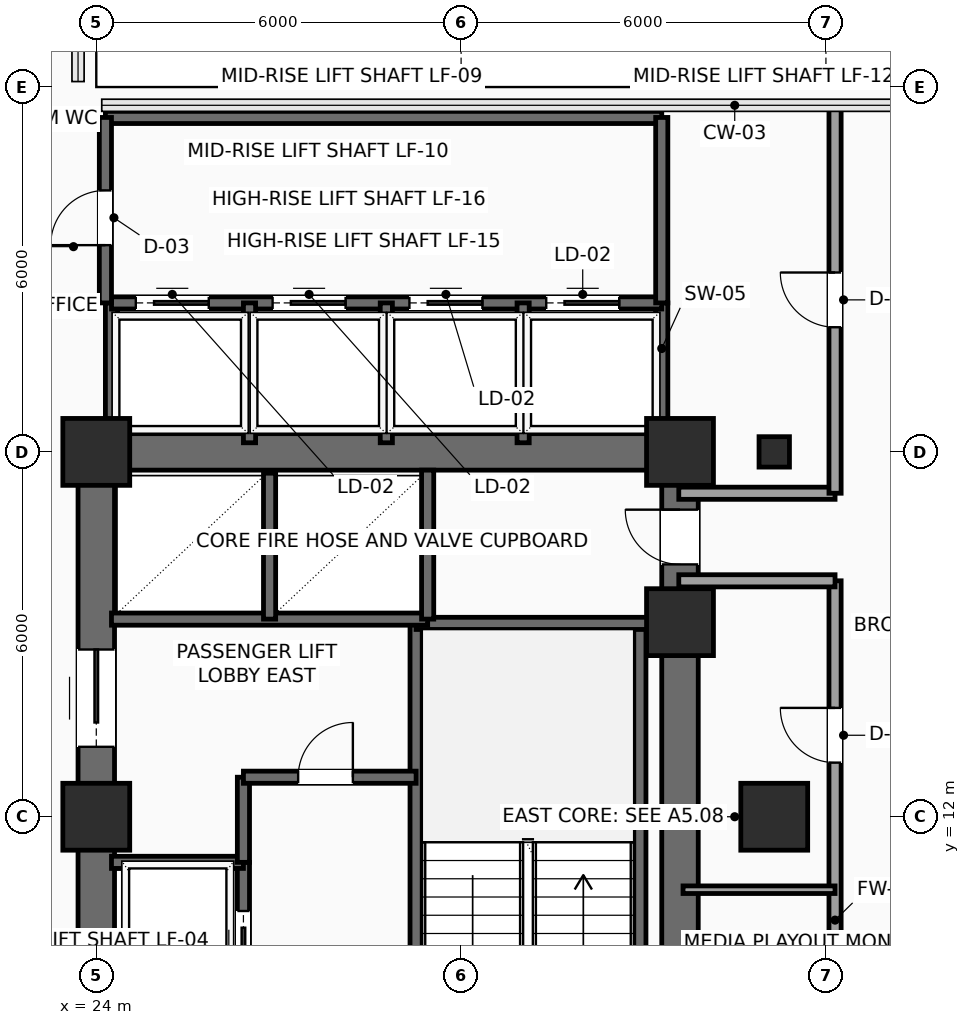
"""IFC4 building model, lengths in metres.
Left out: names, types, materials, properties, quantities, classifications, styles, units other than length and angle.
Written with IfcOpenShell. Run it as: python <this file> out.ifc"""

import sys

from ifc_helpers import new_model, si_unit, direction, frame, frame_2d, origin, origin_2d, place, context, subcontext, project, spatial, rectangle, hollow_rectangle, extrude, element, fill, save


model = new_model("IFC4")
c1 = context("Model", 3, precision=1e-05, world=origin(), true_north=direction((0.0, 1.0)))
c2 = subcontext(c1, "Body", "Model", "MODEL_VIEW")
j1 = project(units=[si_unit("LENGTHUNIT", "METRE"), si_unit("PLANEANGLEUNIT", "RADIAN")], contexts=[c1])
p1 = place(None, origin())
s1 = spatial("IfcSite", under=j1, at=p1, CompositionType="ELEMENT")
p2 = place(p1, origin())
s2 = spatial("IfcBuilding", under=s1, at=p2, CompositionType="ELEMENT")
p3 = place(p2, frame((0.0, 0.0, 149.4)))
s3 = spatial("IfcBuildingStorey", under=s2, at=p3, CompositionType="ELEMENT", Elevation=149.4)
for number, where, z_axis, x_axis in (
    (1, (24.0, 12.0, 0.0), (0.0, 0.0, 1.0), (1.0, 0.0, 0.0)),
    (2, (24.0, 18.0, 0.0), (0.0, 0.0, 1.0), (1.0, 0.0, 0.0)),
    (3, (33.6, 15.2, 0.0), (0.0, 0.0, 1.0), (1.0, 0.0, 0.0)),
    (4, (33.6, 18.0, 0.0), (0.0, 0.0, 1.0), (1.0, 0.0, 0.0)),
    (5, (35.15, 12.0, 0.0), (0.0, 0.0, 1.0), (1.0, 0.0, 0.0)),
):
    element("IfcColumn", number, at=place(p3, frame(where, z_axis=z_axis, x_axis=x_axis)), inside=s3, PredefinedType="COLUMN", context=c2, shape_type="SweptSolid", body=[
        extrude(rectangle(XDim=1.1, YDim=1.1, at=origin_2d()), origin(), (0.0, 0.0, 1.0), 3.75),
    ])
p4 = place(p3, frame((35.15, 18.0, 0.0), z_axis=(0.0, 0.0, 1.0), x_axis=(1.0, 0.0, 0.0)))
e6 = element("IfcColumn", 6, at=p4, inside=s3, PredefinedType="COLUMN", context=c2, shape_type="SweptSolid", body=[
    extrude(hollow_rectangle(XDim=0.5, YDim=0.5, WallThickness=0.025, InnerFilletRadius=0.025, OuterFilletRadius=0.04, at=origin_2d()), origin(), (0.0, 0.0, 1.0), 3.75),
])
p5 = place(p3, frame((24.0, 18.0, 0.0), z_axis=(0.0, 0.0, 1.0), x_axis=(1.0, 0.0, 0.0)))
e7 = element("IfcWall", 7, at=p5, inside=s3, PredefinedType="SHEAR", context=c2, shape_type="SweptSolid", body=[
    extrude(rectangle(XDim=9.6, YDim=0.6, at=frame_2d((4.8, 0.0))), origin(), (0.0, 0.0, 1.0), 3.525),
])
p6 = place(p3, frame((24.0, 6.0, 0.0), z_axis=(0.0, 0.0, 1.0), x_axis=(0.0, 1.0, 0.0)))
e8 = element("IfcWall", 8, at=p6, inside=s3, PredefinedType="SHEAR", context=c2, shape_type="SweptSolid", body=[
    extrude(rectangle(XDim=12.0, YDim=0.6, at=frame_2d((6.0, 0.0))), origin(), (0.0, 0.0, 1.0), 3.525),
])
p7 = place(p6, frame((7.15, 0.0, 0.0)))
e9 = element("IfcOpeningElement", 9, at=p7, cuts=e8, PredefinedType="OPENING", context=c2, shape_type="SweptSolid", body=[
    extrude(rectangle(XDim=1.6, YDim=2.3, at=frame_2d((0.8, 1.15))), frame((0.0, 0.31, 0.0), z_axis=(0.0, -1.0, 0.0), x_axis=(1.0, 0.0, 0.0)), (0.0, 0.0, 1.0), 0.62),
])
p8 = place(p3, frame((33.6, 6.0, 0.0), z_axis=(0.0, 0.0, 1.0), x_axis=(0.0, 1.0, 0.0)))
e10 = element("IfcWall", 10, at=p8, inside=s3, PredefinedType="SHEAR", context=c2, shape_type="SweptSolid", body=[
    extrude(rectangle(XDim=12.0, YDim=0.6, at=frame_2d((6.0, 0.0))), origin(), (0.0, 0.0, 1.0), 3.525),
])
p9 = place(p8, frame((10.15, 0.0, 0.0)))
e11 = element("IfcOpeningElement", 11, at=p9, cuts=e10, PredefinedType="OPENING", context=c2, shape_type="SweptSolid", body=[
    extrude(rectangle(XDim=0.9, YDim=2.15, at=frame_2d((0.45, 1.075))), frame((0.0, 0.31, 0.0), z_axis=(0.0, -1.0, 0.0), x_axis=(1.0, 0.0, 0.0)), (0.0, 0.0, 1.0), 0.62),
])
p10 = place(p3, frame((29.26, 6.3, 0.0), z_axis=(0.0, 0.0, 1.0), x_axis=(0.0, 1.0, 0.0)))
e12 = element("IfcWall", 12, at=p10, inside=s3, PredefinedType="SHEAR", context=c2, shape_type="SweptSolid", body=[
    extrude(rectangle(XDim=8.88, YDim=0.2, at=frame_2d((4.44, 0.0))), origin(), (0.0, 0.0, 1.0), 3.525),
])
p11 = place(p10, frame((0.35, 0.0, 0.0)))
e13 = element("IfcOpeningElement", 13, at=p11, cuts=e12, PredefinedType="OPENING", context=c2, shape_type="SweptSolid", body=[
    extrude(rectangle(XDim=1.1, YDim=2.2, at=frame_2d((0.55, 1.1))), frame((0.0, 0.11, 0.0), z_axis=(0.0, -1.0, 0.0), x_axis=(1.0, 0.0, 0.0)), (0.0, 0.0, 1.0), 0.22),
])
p12 = place(p3, frame((32.94, 6.3, 0.0), z_axis=(0.0, 0.0, 1.0), x_axis=(0.0, 1.0, 0.0)))
e14 = element("IfcWall", 14, at=p12, inside=s3, PredefinedType="SHEAR", context=c2, shape_type="SweptSolid", body=[
    extrude(rectangle(XDim=8.88, YDim=0.2, at=frame_2d((4.44, 0.0))), origin(), (0.0, 0.0, 1.0), 3.525),
])
p13 = place(p3, frame((29.26, 15.18, 0.0), z_axis=(0.0, 0.0, 1.0), x_axis=(1.0, 0.0, 0.0)))
e15 = element("IfcWall", 15, at=p13, inside=s3, PredefinedType="SHEAR", context=c2, shape_type="SweptSolid", body=[
    extrude(rectangle(XDim=4.04, YDim=0.2, at=frame_2d((2.02, 0.0))), origin(), (0.0, 0.0, 1.0), 3.525),
])
p14 = place(p3, frame((26.42, 6.3, 0.0), z_axis=(0.0, 0.0, 1.0), x_axis=(0.0, 1.0, 0.0)))
e16 = element("IfcWall", 16, at=p14, inside=s3, PredefinedType="SHEAR", context=c2, shape_type="SweptSolid", body=[
    extrude(rectangle(XDim=4.95, YDim=0.2, at=frame_2d((2.475, 0.0))), origin(), (0.0, 0.0, 1.0), 3.525),
])
p15 = place(p14, frame((0.65, 0.0, 0.0)))
e17 = element("IfcOpeningElement", 17, at=p15, cuts=e16, PredefinedType="OPENING", context=c2, shape_type="SweptSolid", body=[
    extrude(rectangle(XDim=1.1, YDim=2.2, at=frame_2d((0.55, 1.1))), frame((0.0, 0.11, 0.0), z_axis=(0.0, -1.0, 0.0), x_axis=(1.0, 0.0, 0.0)), (0.0, 0.0, 1.0), 0.22),
])
p16 = place(p14, frame((3.05, 0.0, 0.0)))
e18 = element("IfcOpeningElement", 18, at=p16, cuts=e16, PredefinedType="OPENING", context=c2, shape_type="SweptSolid", body=[
    extrude(rectangle(XDim=1.1, YDim=2.2, at=frame_2d((0.55, 1.1))), frame((0.0, 0.11, 0.0), z_axis=(0.0, -1.0, 0.0), x_axis=(1.0, 0.0, 0.0)), (0.0, 0.0, 1.0), 0.22),
])
p17 = place(p3, frame((24.25, 11.25, 0.0), z_axis=(0.0, 0.0, 1.0), x_axis=(1.0, 0.0, 0.0)))
e19 = element("IfcWall", 19, at=p17, inside=s3, PredefinedType="SHEAR", context=c2, shape_type="SweptSolid", body=[
    extrude(rectangle(XDim=2.17, YDim=0.2, at=frame_2d((1.085, 0.0))), origin(), (0.0, 0.0, 1.0), 3.525),
])
p18 = place(p3, frame((26.42, 11.25, 0.0), z_axis=(0.0, 0.0, 1.0), x_axis=(0.0, 1.0, 0.0)))
e20 = element("IfcWall", 20, at=p18, inside=s3, PredefinedType="SHEAR", context=c2, shape_type="SweptSolid", body=[
    extrude(rectangle(XDim=1.4, YDim=0.2, at=frame_2d((0.7, 0.0))), origin(), (0.0, 0.0, 1.0), 3.525),
])
p19 = place(p3, frame((26.42, 12.65, 0.0), z_axis=(0.0, 0.0, 1.0), x_axis=(1.0, 0.0, 0.0)))
e21 = element("IfcWall", 21, at=p19, inside=s3, PredefinedType="SHEAR", context=c2, shape_type="SweptSolid", body=[
    extrude(rectangle(XDim=2.84, YDim=0.2, at=frame_2d((1.42, 0.0))), origin(), (0.0, 0.0, 1.0), 3.525),
])
p20 = place(p19, frame((0.9, 0.0, 0.0)))
e22 = element("IfcOpeningElement", 22, at=p20, cuts=e21, PredefinedType="OPENING", context=c2, shape_type="SweptSolid", body=[
    extrude(rectangle(XDim=0.9, YDim=2.15, at=frame_2d((0.45, 1.075))), frame((0.0, 0.11, 0.0), z_axis=(0.0, -1.0, 0.0), x_axis=(1.0, 0.0, 0.0)), (0.0, 0.0, 1.0), 0.22),
])
p21 = place(p3, frame((24.25, 15.25, 0.0), z_axis=(0.0, 0.0, 1.0), x_axis=(1.0, 0.0, 0.0)))
e23 = element("IfcWall", 23, at=p21, inside=s3, PredefinedType="SHEAR", context=c2, shape_type="SweptSolid", body=[
    extrude(rectangle(XDim=5.2, YDim=0.2, at=frame_2d((2.6, 0.0))), origin(), (0.0, 0.0, 1.0), 3.525),
])
p22 = place(p3, frame((26.85, 15.25, 0.0), z_axis=(0.0, 0.0, 1.0), x_axis=(0.0, 1.0, 0.0)))
e24 = element("IfcWall", 24, at=p22, inside=s3, PredefinedType="SHEAR", context=c2, shape_type="SweptSolid", body=[
    extrude(rectangle(XDim=2.4, YDim=0.2, at=frame_2d((1.2, 0.0))), origin(), (0.0, 0.0, 1.0), 3.525),
])
p23 = place(p3, frame((29.45, 15.25, 0.0), z_axis=(0.0, 0.0, 1.0), x_axis=(0.0, 1.0, 0.0)))
e25 = element("IfcWall", 25, at=p23, inside=s3, PredefinedType="SHEAR", context=c2, shape_type="SweptSolid", body=[
    extrude(rectangle(XDim=2.45, YDim=0.2, at=frame_2d((1.225, 0.0))), origin(), (0.0, 0.0, 1.0), 3.525),
])
for number, where, z_axis, x_axis in (
    (26, (33.3, 18.1, 0.0), (0.0, 0.0, 1.0), (0.0, 1.0, 0.0)),
    (27, (24.25, 18.1, 0.0), (0.0, 0.0, 1.0), (0.0, 1.0, 0.0)),
):
    element("IfcWall", number, at=place(p3, frame(where, z_axis=z_axis, x_axis=x_axis)), inside=s3, PredefinedType="SHEAR", context=c2, shape_type="SweptSolid", body=[
        extrude(rectangle(XDim=2.35, YDim=0.2, at=frame_2d((1.175, 0.0))), origin(), (0.0, 0.0, 1.0), 3.525),
    ])
p24 = place(p3, frame((24.25, 20.45, 0.0), z_axis=(0.0, 0.0, 1.0), x_axis=(1.0, 0.0, 0.0)))
e28 = element("IfcWall", 28, at=p24, inside=s3, PredefinedType="SHEAR", context=c2, shape_type="SweptSolid", body=[
    extrude(rectangle(XDim=9.05, YDim=0.2, at=frame_2d((4.525, 0.0))), origin(), (0.0, 0.0, 1.0), 3.525),
])
p25 = place(p24, frame((0.4, 0.0, 0.0)))
e29 = element("IfcOpeningElement", 29, at=p25, cuts=e28, PredefinedType="OPENING", context=c2, shape_type="SweptSolid", body=[
    extrude(rectangle(XDim=1.2, YDim=2.2, at=frame_2d((0.6, 1.1))), frame((0.0, 0.11, 0.0), z_axis=(0.0, -1.0, 0.0), x_axis=(1.0, 0.0, 0.0)), (0.0, 0.0, 1.0), 0.22),
])
p26 = place(p24, frame((2.65, 0.0, 0.0)))
e30 = element("IfcOpeningElement", 30, at=p26, cuts=e28, PredefinedType="OPENING", context=c2, shape_type="SweptSolid", body=[
    extrude(rectangle(XDim=1.2, YDim=2.2, at=frame_2d((0.6, 1.1))), frame((0.0, 0.11, 0.0), z_axis=(0.0, -1.0, 0.0), x_axis=(1.0, 0.0, 0.0)), (0.0, 0.0, 1.0), 0.22),
])
p27 = place(p24, frame((4.9, 0.0, 0.0)))
e31 = element("IfcOpeningElement", 31, at=p27, cuts=e28, PredefinedType="OPENING", context=c2, shape_type="SweptSolid", body=[
    extrude(rectangle(XDim=1.2, YDim=2.2, at=frame_2d((0.6, 1.1))), frame((0.0, 0.11, 0.0), z_axis=(0.0, -1.0, 0.0), x_axis=(1.0, 0.0, 0.0)), (0.0, 0.0, 1.0), 0.22),
])
p28 = place(p24, frame((7.15, 0.0, 0.0)))
e32 = element("IfcOpeningElement", 32, at=p28, cuts=e28, PredefinedType="OPENING", context=c2, shape_type="SweptSolid", body=[
    extrude(rectangle(XDim=1.2, YDim=2.2, at=frame_2d((0.6, 1.1))), frame((0.0, 0.11, 0.0), z_axis=(0.0, -1.0, 0.0), x_axis=(1.0, 0.0, 0.0)), (0.0, 0.0, 1.0), 0.22),
])
for number, where, z_axis, x_axis in (
    (33, (26.52, 18.15, 0.0), (0.0, 0.0, 1.0), (0.0, 1.0, 0.0)),
    (34, (28.77, 18.15, 0.0), (0.0, 0.0, 1.0), (0.0, 1.0, 0.0)),
    (35, (31.02, 18.15, 0.0), (0.0, 0.0, 1.0), (0.0, 1.0, 0.0)),
):
    element("IfcWall", number, at=place(p3, frame(where, z_axis=z_axis, x_axis=x_axis)), inside=s3, PredefinedType="SHEAR", context=c2, shape_type="SweptSolid", body=[
        extrude(rectangle(XDim=2.3, YDim=0.2, at=frame_2d((1.15, 0.0))), origin(), (0.0, 0.0, 1.0), 3.525),
    ])
p29 = place(p3, frame((24.15, 23.5, 0.0), z_axis=(0.0, 0.0, 1.0), x_axis=(1.0, 0.0, 0.0)))
e36 = element("IfcWall", 36, at=p29, inside=s3, PredefinedType="SHEAR", context=c2, shape_type="SweptSolid", body=[
    extrude(rectangle(XDim=9.15, YDim=0.2, at=frame_2d((4.575, 0.0))), origin(), (0.0, 0.0, 1.0), 3.525),
])
p30 = place(p3, frame((33.3, 20.45, 0.0), z_axis=(0.0, 0.0, 1.0), x_axis=(0.0, 1.0, 0.0)))
e37 = element("IfcWall", 37, at=p30, inside=s3, PredefinedType="SHEAR", context=c2, shape_type="SweptSolid", body=[
    extrude(rectangle(XDim=3.05, YDim=0.2, at=frame_2d((1.525, 0.0))), origin(), (0.0, 0.0, 1.0), 3.525),
])
p31 = place(p3, frame((24.15, 20.45, 0.0), z_axis=(0.0, 0.0, 1.0), x_axis=(0.0, 1.0, 0.0)))
e38 = element("IfcWall", 38, at=p31, inside=s3, PredefinedType="SHEAR", context=c2, shape_type="SweptSolid", body=[
    extrude(rectangle(XDim=3.05, YDim=0.2, at=frame_2d((1.525, 0.0))), origin(), (0.0, 0.0, 1.0), 3.525),
])
p32 = place(p31, frame((0.95, 0.0, 0.0)))
e39 = element("IfcOpeningElement", 39, at=p32, cuts=e38, PredefinedType="OPENING", context=c2, shape_type="SweptSolid", body=[
    extrude(rectangle(XDim=0.9, YDim=2.15, at=frame_2d((0.45, 1.075))), frame((0.0, 0.11, 0.0), z_axis=(0.0, -1.0, 0.0), x_axis=(1.0, 0.0, 0.0)), (0.0, 0.0, 1.0), 0.22),
])
p33 = place(p3, frame((36.15, 5.8, 0.0), z_axis=(0.0, 0.0, 1.0), x_axis=(0.0, 1.0, 0.0)))
e40 = element("IfcWall", 40, at=p33, inside=s3, PredefinedType="SOLIDWALL", context=c2, shape_type="SweptSolid", body=[
    extrude(rectangle(XDim=10.08, YDim=0.2, at=frame_2d((5.04, 0.0))), origin(), (0.0, 0.0, 1.0), 3.525),
])
p34 = place(p33, frame((2.05, 0.0, 0.0)))
e41 = element("IfcOpeningElement", 41, at=p34, cuts=e40, PredefinedType="OPENING", context=c2, shape_type="SweptSolid", body=[
    extrude(rectangle(XDim=0.9, YDim=2.1, at=frame_2d((0.45, 1.05))), frame((0.0, 0.11, 0.0), z_axis=(0.0, -1.0, 0.0), x_axis=(1.0, 0.0, 0.0)), (0.0, 0.0, 1.0), 0.22),
])
p35 = place(p33, frame((7.09, 0.0, 0.0)))
e42 = element("IfcOpeningElement", 42, at=p35, cuts=e40, PredefinedType="OPENING", context=c2, shape_type="SweptSolid", body=[
    extrude(rectangle(XDim=0.9, YDim=2.1, at=frame_2d((0.45, 1.05))), frame((0.0, 0.11, 0.0), z_axis=(0.0, -1.0, 0.0), x_axis=(1.0, 0.0, 0.0)), (0.0, 0.0, 1.0), 0.22),
])
for number, where, z_axis, x_axis in (
    (43, (36.15, 15.88, 0.0), (0.0, 0.0, 1.0), (-1.0, 0.0, 0.0)),
    (44, (33.58, 17.32, 0.0), (0.0, 0.0, 1.0), (1.0, 0.0, 0.0)),
):
    element("IfcWall", number, at=place(p3, frame(where, z_axis=z_axis, x_axis=x_axis)), inside=s3, PredefinedType="SOLIDWALL", context=c2, shape_type="SweptSolid", body=[
        extrude(rectangle(XDim=2.57, YDim=0.2, at=frame_2d((1.285, 0.0))), origin(), (0.0, 0.0, 1.0), 3.525),
    ])
p36 = place(p3, frame((36.15, 17.32, 0.0), z_axis=(0.0, 0.0, 1.0), x_axis=(0.0, 1.0, 0.0)))
e45 = element("IfcWall", 45, at=p36, inside=s3, PredefinedType="SOLIDWALL", context=c2, shape_type="SweptSolid", body=[
    extrude(rectangle(XDim=6.38, YDim=0.2, at=frame_2d((3.19, 0.0))), origin(), (0.0, 0.0, 1.0), 3.525),
])
p37 = place(p36, frame((2.73, 0.0, 0.0)))
e46 = element("IfcOpeningElement", 46, at=p37, cuts=e45, PredefinedType="OPENING", context=c2, shape_type="SweptSolid", body=[
    extrude(rectangle(XDim=0.9, YDim=2.1, at=frame_2d((0.45, 1.05))), frame((0.0, 0.11, 0.0), z_axis=(0.0, -1.0, 0.0), x_axis=(1.0, 0.0, 0.0)), (0.0, 0.0, 1.0), 0.22),
])
p38 = place(p3, frame((33.65, 10.8, 0.0), z_axis=(0.0, 0.0, 1.0), x_axis=(1.0, 0.0, 0.0)))
e47 = element("IfcWall", 47, at=p38, inside=s3, PredefinedType="PARTITIONING", context=c2, shape_type="SweptSolid", body=[
    extrude(rectangle(XDim=2.5, YDim=0.125, at=frame_2d((1.25, 0.0))), origin(), (0.0, 0.0, 1.0), 3.525),
])
p39 = place(p7, origin())
e48 = element("IfcDoor", 48, at=p39, inside=s3, OperationType="DOUBLE_DOOR_SLIDING", PredefinedType="DOOR", context=c2, shape_type="SweptSolid", body=[
    extrude(rectangle(XDim=1.6, YDim=2.3, at=frame_2d((0.8, 1.15))), frame((0.0, 0.025, 0.0), z_axis=(0.0, -1.0, 0.0), x_axis=(1.0, 0.0, 0.0)), (0.0, 0.0, 1.0), 0.05),
])
fill(e9, e48)
p40 = place(p9, origin())
e49 = element("IfcDoor", 49, at=p40, inside=s3, OperationType="SINGLE_SWING_RIGHT", PredefinedType="DOOR", context=c2, shape_type="SweptSolid", body=[
    extrude(rectangle(XDim=0.9, YDim=2.15, at=frame_2d((0.45, 1.075))), frame((0.0, 0.025, 0.0), z_axis=(0.0, -1.0, 0.0), x_axis=(1.0, 0.0, 0.0)), (0.0, 0.0, 1.0), 0.05),
])
fill(e11, e49)
p41 = place(p16, origin())
e50 = element("IfcDoor", 50, at=p41, inside=s3, OperationType="SLIDING_TO_LEFT", PredefinedType="DOOR", context=c2, shape_type="SweptSolid", body=[
    extrude(rectangle(XDim=1.1, YDim=2.2, at=frame_2d((0.55, 1.1))), frame((0.0, 0.025, 0.0), z_axis=(0.0, -1.0, 0.0), x_axis=(1.0, 0.0, 0.0)), (0.0, 0.0, 1.0), 0.05),
])
fill(e18, e50)
p42 = place(p20, origin())
e51 = element("IfcDoor", 51, at=p42, inside=s3, OperationType="SINGLE_SWING_RIGHT", PredefinedType="DOOR", context=c2, shape_type="SweptSolid", body=[
    extrude(rectangle(XDim=0.9, YDim=2.15, at=frame_2d((0.45, 1.075))), frame((0.0, 0.025, 0.0), z_axis=(0.0, -1.0, 0.0), x_axis=(1.0, 0.0, 0.0)), (0.0, 0.0, 1.0), 0.05),
])
fill(e22, e51)
p43 = place(p25, origin())
e52 = element("IfcDoor", 52, at=p43, inside=s3, OperationType="SLIDING_TO_RIGHT", PredefinedType="DOOR", context=c2, shape_type="SweptSolid", body=[
    extrude(rectangle(XDim=1.2, YDim=2.2, at=frame_2d((0.6, 1.1))), frame((0.0, 0.025, 0.0), z_axis=(0.0, -1.0, 0.0), x_axis=(1.0, 0.0, 0.0)), (0.0, 0.0, 1.0), 0.05),
])
fill(e29, e52)
p44 = place(p26, origin())
e53 = element("IfcDoor", 53, at=p44, inside=s3, OperationType="SLIDING_TO_RIGHT", PredefinedType="DOOR", context=c2, shape_type="SweptSolid", body=[
    extrude(rectangle(XDim=1.2, YDim=2.2, at=frame_2d((0.6, 1.1))), frame((0.0, 0.025, 0.0), z_axis=(0.0, -1.0, 0.0), x_axis=(1.0, 0.0, 0.0)), (0.0, 0.0, 1.0), 0.05),
])
fill(e30, e53)
p45 = place(p27, origin())
e54 = element("IfcDoor", 54, at=p45, inside=s3, OperationType="SLIDING_TO_RIGHT", PredefinedType="DOOR", context=c2, shape_type="SweptSolid", body=[
    extrude(rectangle(XDim=1.2, YDim=2.2, at=frame_2d((0.6, 1.1))), frame((0.0, 0.025, 0.0), z_axis=(0.0, -1.0, 0.0), x_axis=(1.0, 0.0, 0.0)), (0.0, 0.0, 1.0), 0.05),
])
fill(e31, e54)
p46 = place(p28, origin())
e55 = element("IfcDoor", 55, at=p46, inside=s3, OperationType="SLIDING_TO_RIGHT", PredefinedType="DOOR", context=c2, shape_type="SweptSolid", body=[
    extrude(rectangle(XDim=1.2, YDim=2.2, at=frame_2d((0.6, 1.1))), frame((0.0, 0.025, 0.0), z_axis=(0.0, -1.0, 0.0), x_axis=(1.0, 0.0, 0.0)), (0.0, 0.0, 1.0), 0.05),
])
fill(e32, e55)
p47 = place(p32, origin())
e56 = element("IfcDoor", 56, at=p47, inside=s3, OperationType="SINGLE_SWING_LEFT", PredefinedType="DOOR", context=c2, shape_type="SweptSolid", body=[
    extrude(rectangle(XDim=0.9, YDim=2.15, at=frame_2d((0.45, 1.075))), frame((0.0, 0.025, 0.0), z_axis=(0.0, -1.0, 0.0), x_axis=(1.0, 0.0, 0.0)), (0.0, 0.0, 1.0), 0.05),
])
fill(e39, e56)
p48 = place(p35, origin())
e57 = element("IfcDoor", 57, at=p48, inside=s3, OperationType="SINGLE_SWING_RIGHT", PredefinedType="DOOR", context=c2, shape_type="SweptSolid", body=[
    extrude(rectangle(XDim=0.9, YDim=2.1, at=frame_2d((0.45, 1.05))), frame((0.0, 0.025, 0.0), z_axis=(0.0, -1.0, 0.0), x_axis=(1.0, 0.0, 0.0)), (0.0, 0.0, 1.0), 0.05),
])
fill(e42, e57)
p49 = place(p37, origin())
e58 = element("IfcDoor", 58, at=p49, inside=s3, OperationType="SINGLE_SWING_RIGHT", PredefinedType="DOOR", context=c2, shape_type="SweptSolid", body=[
    extrude(rectangle(XDim=0.9, YDim=2.1, at=frame_2d((0.45, 1.05))), frame((0.0, 0.025, 0.0), z_axis=(0.0, -1.0, 0.0), x_axis=(1.0, 0.0, 0.0)), (0.0, 0.0, 1.0), 0.05),
])
fill(e46, e58)
save(model, sys.argv[1])
